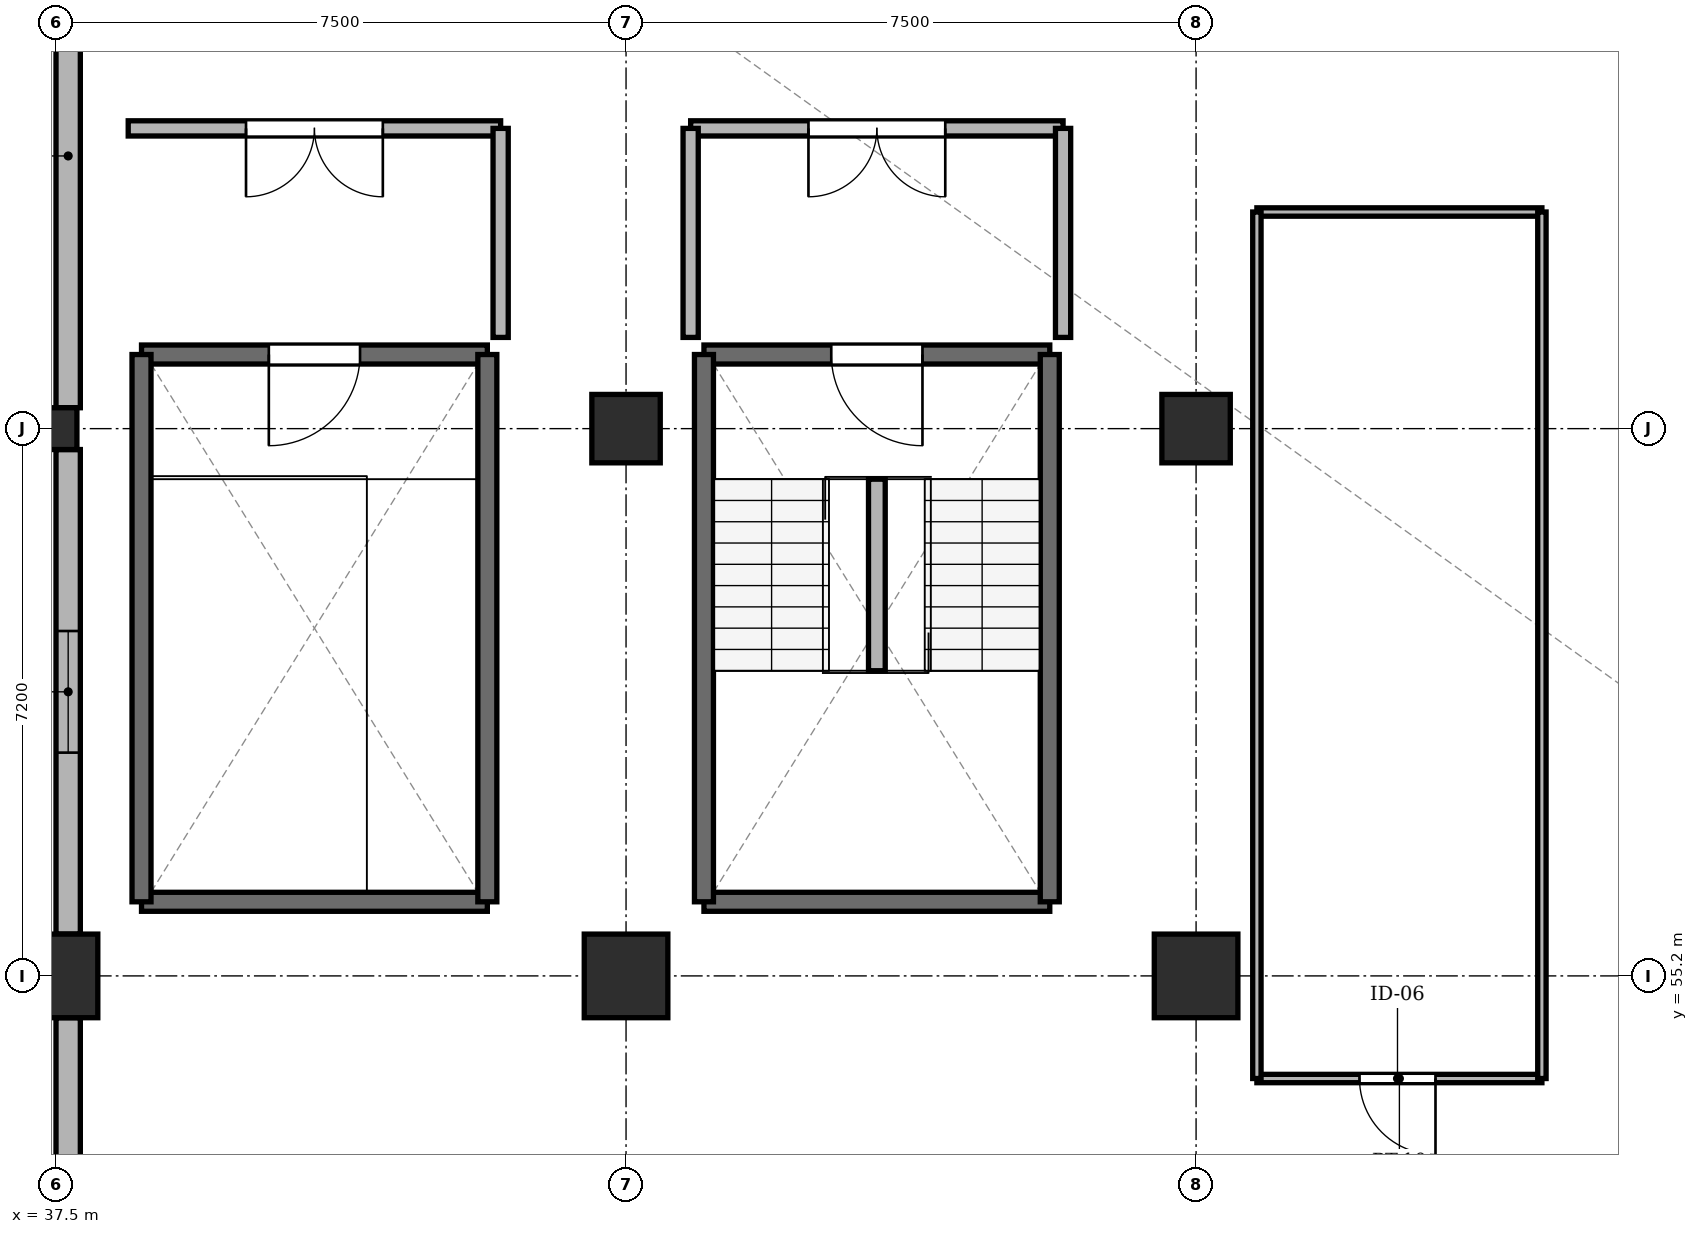
"""IFC4 building model, lengths in metres.
Left out: names, types, materials, properties, quantities, classifications, styles, units other than length and angle.
Written with IfcOpenShell. Run it as: python <this file> out.ifc"""

import sys

from ifc_helpers import new_model, si_unit, direction, frame, frame_2d, origin, origin_2d, place, context, subcontext, project, spatial, rectangle, extrude, element, fill, save


model = new_model("IFC4")
c1 = context("Model", 3, precision=1e-05, world=origin(), true_north=direction((0.0, 1.0)))
c2 = subcontext(c1, "Body", "Model", "MODEL_VIEW")
j1 = project(units=[si_unit("LENGTHUNIT", "METRE"), si_unit("PLANEANGLEUNIT", "RADIAN")], contexts=[c1])
p1 = place(None, origin())
s1 = spatial("IfcSite", under=j1, at=p1, CompositionType="ELEMENT")
p2 = place(p1, origin())
s2 = spatial("IfcBuilding", under=s1, at=p2, CompositionType="ELEMENT")
p3 = place(p2, frame((0.0, 0.0, 24.15)))
s3 = spatial("IfcBuildingStorey", under=s2, at=p3, CompositionType="ELEMENT", Elevation=24.15)
p4 = place(p3, frame((37.5, 55.2, -0.5), z_axis=(0.0, 0.0, 1.0), x_axis=(1.0, 0.0, 0.0)))
e1 = element("IfcColumn", 1, at=p4, inside=s3, PredefinedType="COLUMN", context=c2, shape_type="SweptSolid", body=[
    extrude(rectangle(XDim=1.1, YDim=1.1, at=origin_2d()), origin(), (0.0, 0.0, 1.0), 3.64),
])
p5 = place(p3, frame((37.5, 62.4, -0.5), z_axis=(0.0, 0.0, 1.0), x_axis=(1.0, 0.0, 0.0)))
e2 = element("IfcColumn", 2, at=p5, inside=s3, PredefinedType="COLUMN", context=c2, shape_type="SweptSolid", body=[
    extrude(rectangle(XDim=0.55, YDim=0.55, at=origin_2d()), origin(), (0.0, 0.0, 1.0), 3.64),
])
p6 = place(p3, frame((45.0, 55.2, -0.5), z_axis=(0.0, 0.0, 1.0), x_axis=(1.0, 0.0, 0.0)))
e3 = element("IfcColumn", 3, at=p6, inside=s3, PredefinedType="COLUMN", context=c2, shape_type="SweptSolid", body=[
    extrude(rectangle(XDim=1.1, YDim=1.1, at=origin_2d()), origin(), (0.0, 0.0, 1.0), 3.64),
])
p7 = place(p3, frame((45.0, 62.4, -0.5), z_axis=(0.0, 0.0, 1.0), x_axis=(1.0, 0.0, 0.0)))
e4 = element("IfcColumn", 4, at=p7, inside=s3, PredefinedType="COLUMN", context=c2, shape_type="SweptSolid", body=[
    extrude(rectangle(XDim=0.9, YDim=0.9, at=origin_2d()), origin(), (0.0, 0.0, 1.0), 3.64),
])
p8 = place(p3, frame((52.5, 55.2, -0.5), z_axis=(0.0, 0.0, 1.0), x_axis=(1.0, 0.0, 0.0)))
e5 = element("IfcColumn", 5, at=p8, inside=s3, PredefinedType="COLUMN", context=c2, shape_type="SweptSolid", body=[
    extrude(rectangle(XDim=1.1, YDim=1.1, at=origin_2d()), origin(), (0.0, 0.0, 1.0), 3.64),
])
p9 = place(p3, frame((52.5, 62.4, -0.5), z_axis=(0.0, 0.0, 1.0), x_axis=(1.0, 0.0, 0.0)))
e6 = element("IfcColumn", 6, at=p9, inside=s3, PredefinedType="COLUMN", context=c2, shape_type="SweptSolid", body=[
    extrude(rectangle(XDim=0.9, YDim=0.9, at=origin_2d()), origin(), (0.0, 0.0, 1.0), 3.64),
])
p10 = place(p3, frame((37.66, 69.3, 0.0), z_axis=(0.0, 0.0, 1.0), x_axis=(0.0, -1.0, 0.0)))
e7 = element("IfcWall", 7, at=p10, inside=s3, PredefinedType="SOLIDWALL", context=c2, shape_type="SweptSolid", body=[
    extrude(rectangle(XDim=6.625, YDim=0.32, at=frame_2d((3.312, 0.0))), origin(), (0.0, 0.0, 1.0), 2.68),
])
p11 = place(p3, frame((37.66, 62.125, 0.0), z_axis=(0.0, 0.0, 1.0), x_axis=(0.0, -1.0, 0.0)))
e8 = element("IfcWall", 8, at=p11, inside=s3, PredefinedType="SOLIDWALL", context=c2, shape_type="SweptSolid", body=[
    extrude(rectangle(XDim=6.375, YDim=0.32, at=frame_2d((3.188, 0.0))), origin(), (0.0, 0.0, 1.0), 2.68),
])
p12 = place(p11, frame((2.387, 0.0, 0.62)))
e9 = element("IfcOpeningElement", 9, at=p12, cuts=e8, PredefinedType="OPENING", context=c2, shape_type="SweptSolid", body=[
    extrude(rectangle(XDim=1.6, YDim=1.96, at=frame_2d((0.8, 0.98))), frame((0.0, 0.172, 0.0), z_axis=(0.0, -1.0, 0.0), x_axis=(1.0, 0.0, 0.0)), (0.0, 0.0, 1.0), 0.344),
])
p13 = place(p3, frame((37.66, 54.65, 0.0), z_axis=(0.0, 0.0, 1.0), x_axis=(0.0, -1.0, 0.0)))
e10 = element("IfcWall", 10, at=p13, inside=s3, PredefinedType="SOLIDWALL", context=c2, shape_type="SweptSolid", body=[
    extrude(rectangle(XDim=5.775, YDim=0.32, at=frame_2d((2.887, 0.0))), origin(), (0.0, 0.0, 1.0), 2.68),
])
p14 = place(p13, frame((2.087, 0.0, 0.0)))
e11 = element("IfcOpeningElement", 11, at=p14, cuts=e10, PredefinedType="OPENING", context=c2, shape_type="SweptSolid", body=[
    extrude(rectangle(XDim=1.6, YDim=2.2, at=frame_2d((0.8, 1.1))), frame((0.0, 0.172, 0.0), z_axis=(0.0, -1.0, 0.0), x_axis=(1.0, 0.0, 0.0)), (0.0, 0.0, 1.0), 0.344),
])
p15 = place(p3, frame((46.025, 56.175, 0.0), z_axis=(0.0, 0.0, 1.0), x_axis=(1.0, 0.0, 0.0)))
e12 = element("IfcWall", 12, at=p15, inside=s3, PredefinedType="SHEAR", context=c2, shape_type="SweptSolid", body=[
    extrude(rectangle(XDim=4.55, YDim=0.25, at=frame_2d((2.275, 0.0))), origin(), (0.0, 0.0, 1.0), 3.14),
])
p16 = place(p3, frame((50.575, 63.375, 0.0), z_axis=(0.0, 0.0, 1.0), x_axis=(-1.0, 0.0, 0.0)))
e13 = element("IfcWall", 13, at=p16, inside=s3, PredefinedType="SHEAR", context=c2, shape_type="SweptSolid", body=[
    extrude(rectangle(XDim=4.55, YDim=0.25, at=frame_2d((2.275, 0.0))), origin(), (0.0, 0.0, 1.0), 3.14),
])
p17 = place(p16, frame((1.675, 0.0, 0.0)))
e14 = element("IfcOpeningElement", 14, at=p17, cuts=e13, PredefinedType="OPENING", context=c2, shape_type="SweptSolid", body=[
    extrude(rectangle(XDim=1.2, YDim=2.2, at=frame_2d((0.6, 1.1))), frame((0.0, 0.137, 0.0), z_axis=(0.0, -1.0, 0.0), x_axis=(1.0, 0.0, 0.0)), (0.0, 0.0, 1.0), 0.274),
])
for number, where, z_axis, x_axis in (
    (15, (46.025, 63.375, 0.0), (0.0, 0.0, 1.0), (0.0, -1.0, 0.0)),
    (16, (50.575, 56.175, 0.0), (0.0, 0.0, 1.0), (0.0, 1.0, 0.0)),
):
    element("IfcWall", number, at=place(p3, frame(where, z_axis=z_axis, x_axis=x_axis)), inside=s3, PredefinedType="SHEAR", context=c2, shape_type="SweptSolid", body=[
        extrude(rectangle(XDim=7.2, YDim=0.25, at=frame_2d((3.6, 0.0))), origin(), (0.0, 0.0, 1.0), 3.14),
    ])
p18 = place(p3, frame((48.3, 59.215, 0.0), z_axis=(0.0, 0.0, 1.0), x_axis=(0.0, 1.0, 0.0)))
e17 = element("IfcWall", 17, at=p18, inside=s3, PredefinedType="PARTITIONING", context=c2, shape_type="SweptSolid", body=[
    extrude(rectangle(XDim=2.52, YDim=0.22, at=frame_2d((1.26, 0.0))), origin(), (0.0, 0.0, 1.0), 3.14),
])
p19 = place(p3, frame((38.625, 56.175, 0.0), z_axis=(0.0, 0.0, 1.0), x_axis=(1.0, 0.0, 0.0)))
e18 = element("IfcWall", 18, at=p19, inside=s3, PredefinedType="SHEAR", context=c2, shape_type="SweptSolid", body=[
    extrude(rectangle(XDim=4.55, YDim=0.25, at=frame_2d((2.275, 0.0))), origin(), (0.0, 0.0, 1.0), 3.14),
])
p20 = place(p3, frame((43.175, 63.375, 0.0), z_axis=(0.0, 0.0, 1.0), x_axis=(-1.0, 0.0, 0.0)))
e19 = element("IfcWall", 19, at=p20, inside=s3, PredefinedType="SHEAR", context=c2, shape_type="SweptSolid", body=[
    extrude(rectangle(XDim=4.55, YDim=0.25, at=frame_2d((2.275, 0.0))), origin(), (0.0, 0.0, 1.0), 3.14),
])
p21 = place(p20, frame((1.675, 0.0, 0.0)))
e20 = element("IfcOpeningElement", 20, at=p21, cuts=e19, PredefinedType="OPENING", context=c2, shape_type="SweptSolid", body=[
    extrude(rectangle(XDim=1.2, YDim=2.2, at=frame_2d((0.6, 1.1))), frame((0.0, 0.137, 0.0), z_axis=(0.0, -1.0, 0.0), x_axis=(1.0, 0.0, 0.0)), (0.0, 0.0, 1.0), 0.274),
])
for number, where, z_axis, x_axis in (
    (21, (38.625, 63.375, 0.0), (0.0, 0.0, 1.0), (0.0, -1.0, 0.0)),
    (22, (43.175, 56.175, 0.0), (0.0, 0.0, 1.0), (0.0, 1.0, 0.0)),
):
    element("IfcWall", number, at=place(p3, frame(where, z_axis=z_axis, x_axis=x_axis)), inside=s3, PredefinedType="SHEAR", context=c2, shape_type="SweptSolid", body=[
        extrude(rectangle(XDim=7.2, YDim=0.25, at=frame_2d((3.6, 0.0))), origin(), (0.0, 0.0, 1.0), 3.14),
    ])
p22 = place(p3, frame((45.85, 66.35, 0.0), z_axis=(0.0, 0.0, 1.0), x_axis=(1.0, 0.0, 0.0)))
e23 = element("IfcWall", 23, at=p22, inside=s3, PredefinedType="PARTITIONING", context=c2, shape_type="SweptSolid", body=[
    extrude(rectangle(XDim=4.9, YDim=0.2, at=frame_2d((2.45, 0.0))), origin(), (0.0, 0.0, 1.0), 2.68),
])
p23 = place(p22, frame((1.55, 0.0, 0.0)))
e24 = element("IfcOpeningElement", 24, at=p23, cuts=e23, PredefinedType="OPENING", context=c2, shape_type="SweptSolid", body=[
    extrude(rectangle(XDim=1.8, YDim=2.2, at=frame_2d((0.9, 1.1))), frame((0.0, 0.112, 0.0), z_axis=(0.0, -1.0, 0.0), x_axis=(1.0, 0.0, 0.0)), (0.0, 0.0, 1.0), 0.224),
])
for number, where, z_axis, x_axis in (
    (25, (45.85, 63.6, 0.0), (0.0, 0.0, 1.0), (0.0, 1.0, 0.0)),
    (26, (50.75, 63.6, 0.0), (0.0, 0.0, 1.0), (0.0, 1.0, 0.0)),
):
    element("IfcWall", number, at=place(p3, frame(where, z_axis=z_axis, x_axis=x_axis)), inside=s3, PredefinedType="PARTITIONING", context=c2, shape_type="SweptSolid", body=[
        extrude(rectangle(XDim=2.75, YDim=0.2, at=frame_2d((1.375, 0.0))), origin(), (0.0, 0.0, 1.0), 2.68),
    ])
p24 = place(p3, frame((38.45, 66.35, 0.0), z_axis=(0.0, 0.0, 1.0), x_axis=(1.0, 0.0, 0.0)))
e27 = element("IfcWall", 27, at=p24, inside=s3, PredefinedType="PARTITIONING", context=c2, shape_type="SweptSolid", body=[
    extrude(rectangle(XDim=4.9, YDim=0.2, at=frame_2d((2.45, 0.0))), origin(), (0.0, 0.0, 1.0), 2.68),
])
p25 = place(p24, frame((1.55, 0.0, 0.0)))
e28 = element("IfcOpeningElement", 28, at=p25, cuts=e27, PredefinedType="OPENING", context=c2, shape_type="SweptSolid", body=[
    extrude(rectangle(XDim=1.8, YDim=2.2, at=frame_2d((0.9, 1.1))), frame((0.0, 0.112, 0.0), z_axis=(0.0, -1.0, 0.0), x_axis=(1.0, 0.0, 0.0)), (0.0, 0.0, 1.0), 0.224),
])
p26 = place(p3, frame((43.35, 63.6, 0.0), z_axis=(0.0, 0.0, 1.0), x_axis=(0.0, 1.0, 0.0)))
e29 = element("IfcWall", 29, at=p26, inside=s3, PredefinedType="PARTITIONING", context=c2, shape_type="SweptSolid", body=[
    extrude(rectangle(XDim=2.75, YDim=0.2, at=frame_2d((1.375, 0.0))), origin(), (0.0, 0.0, 1.0), 2.68),
])
p27 = place(p3, frame((53.3, 53.85, 0.0), z_axis=(0.0, 0.0, 1.0), x_axis=(1.0, 0.0, 0.0)))
e30 = element("IfcWall", 30, at=p27, inside=s3, PredefinedType="PARTITIONING", context=c2, shape_type="SweptSolid", body=[
    extrude(rectangle(XDim=3.75, YDim=0.11, at=frame_2d((1.875, 0.0))), origin(), (0.0, 0.0, 1.0), 2.68),
])
p28 = place(p27, frame((1.35, 0.0, 0.0)))
e31 = element("IfcOpeningElement", 31, at=p28, cuts=e30, PredefinedType="OPENING", context=c2, shape_type="SweptSolid", body=[
    extrude(rectangle(XDim=1.0, YDim=2.15, at=frame_2d((0.5, 1.075))), frame((0.0, 0.067, 0.0), z_axis=(0.0, -1.0, 0.0), x_axis=(1.0, 0.0, 0.0)), (0.0, 0.0, 1.0), 0.134),
])
p29 = place(p3, frame((53.3, 65.25, 0.0), z_axis=(0.0, 0.0, 1.0), x_axis=(1.0, 0.0, 0.0)))
e32 = element("IfcWall", 32, at=p29, inside=s3, PredefinedType="PARTITIONING", context=c2, shape_type="SweptSolid", body=[
    extrude(rectangle(XDim=3.75, YDim=0.11, at=frame_2d((1.875, 0.0))), origin(), (0.0, 0.0, 1.0), 2.68),
])
for number, where, z_axis, x_axis in (
    (33, (53.3, 53.85, 0.0), (0.0, 0.0, 1.0), (0.0, 1.0, 0.0)),
    (34, (57.05, 53.85, 0.0), (0.0, 0.0, 1.0), (0.0, 1.0, 0.0)),
):
    element("IfcWall", number, at=place(p3, frame(where, z_axis=z_axis, x_axis=x_axis)), inside=s3, PredefinedType="PARTITIONING", context=c2, shape_type="SweptSolid", body=[
        extrude(rectangle(XDim=11.4, YDim=0.11, at=frame_2d((5.7, 0.0))), origin(), (0.0, 0.0, 1.0), 2.68),
    ])
p30 = place(p12, origin())
e35 = element("IfcWindow", 35, at=p30, inside=s3, PartitioningType="SINGLE_PANEL", PredefinedType="WINDOW", context=c2, shape_type="SweptSolid", body=[
    extrude(rectangle(XDim=1.6, YDim=1.96, at=frame_2d((0.8, 0.98))), frame((0.0, 0.03, 0.0), z_axis=(0.0, -1.0, 0.0), x_axis=(1.0, 0.0, 0.0)), (0.0, 0.0, 1.0), 0.06),
])
fill(e9, e35)
p31 = place(p17, origin())
e36 = element("IfcDoor", 36, at=p31, inside=s3, OperationType="SINGLE_SWING_LEFT", PredefinedType="DOOR", context=c2, shape_type="SweptSolid", body=[
    extrude(rectangle(XDim=1.2, YDim=2.2, at=frame_2d((0.6, 1.1))), frame((0.0, 0.025, 0.0), z_axis=(0.0, -1.0, 0.0), x_axis=(1.0, 0.0, 0.0)), (0.0, 0.0, 1.0), 0.05),
])
fill(e14, e36)
p32 = place(p21, origin())
e37 = element("IfcDoor", 37, at=p32, inside=s3, OperationType="SINGLE_SWING_RIGHT", PredefinedType="DOOR", context=c2, shape_type="SweptSolid", body=[
    extrude(rectangle(XDim=1.2, YDim=2.2, at=frame_2d((0.6, 1.1))), frame((0.0, 0.025, 0.0), z_axis=(0.0, -1.0, 0.0), x_axis=(1.0, 0.0, 0.0)), (0.0, 0.0, 1.0), 0.05),
])
fill(e20, e37)
p33 = place(p23, frame((1.8, 0.0, 0.0), z_axis=(0.0, 0.0, 1.0), x_axis=(-1.0, 0.0, 0.0)))
e38 = element("IfcDoor", 38, at=p33, inside=s3, OperationType="DOUBLE_DOOR_SINGLE_SWING", PredefinedType="DOOR", context=c2, shape_type="SweptSolid", body=[
    extrude(rectangle(XDim=1.8, YDim=2.2, at=frame_2d((0.9, 1.1))), frame((0.0, 0.025, 0.0), z_axis=(0.0, -1.0, 0.0), x_axis=(1.0, 0.0, 0.0)), (0.0, 0.0, 1.0), 0.05),
])
fill(e24, e38)
p34 = place(p25, frame((1.8, 0.0, 0.0), z_axis=(0.0, 0.0, 1.0), x_axis=(-1.0, 0.0, 0.0)))
e39 = element("IfcDoor", 39, at=p34, inside=s3, OperationType="DOUBLE_DOOR_SINGLE_SWING", PredefinedType="DOOR", context=c2, shape_type="SweptSolid", body=[
    extrude(rectangle(XDim=1.8, YDim=2.2, at=frame_2d((0.9, 1.1))), frame((0.0, 0.025, 0.0), z_axis=(0.0, -1.0, 0.0), x_axis=(1.0, 0.0, 0.0)), (0.0, 0.0, 1.0), 0.05),
])
fill(e28, e39)
p35 = place(p28, frame((1.0, 0.0, 0.0), z_axis=(0.0, 0.0, 1.0), x_axis=(-1.0, 0.0, 0.0)))
e40 = element("IfcDoor", 40, at=p35, inside=s3, OperationType="SINGLE_SWING_RIGHT", PredefinedType="DOOR", context=c2, shape_type="SweptSolid", body=[
    extrude(rectangle(XDim=1.0, YDim=2.15, at=frame_2d((0.5, 1.075))), frame((0.0, 0.025, 0.0), z_axis=(0.0, -1.0, 0.0), x_axis=(1.0, 0.0, 0.0)), (0.0, 0.0, 1.0), 0.05),
])
fill(e31, e40)
save(model, sys.argv[1])
